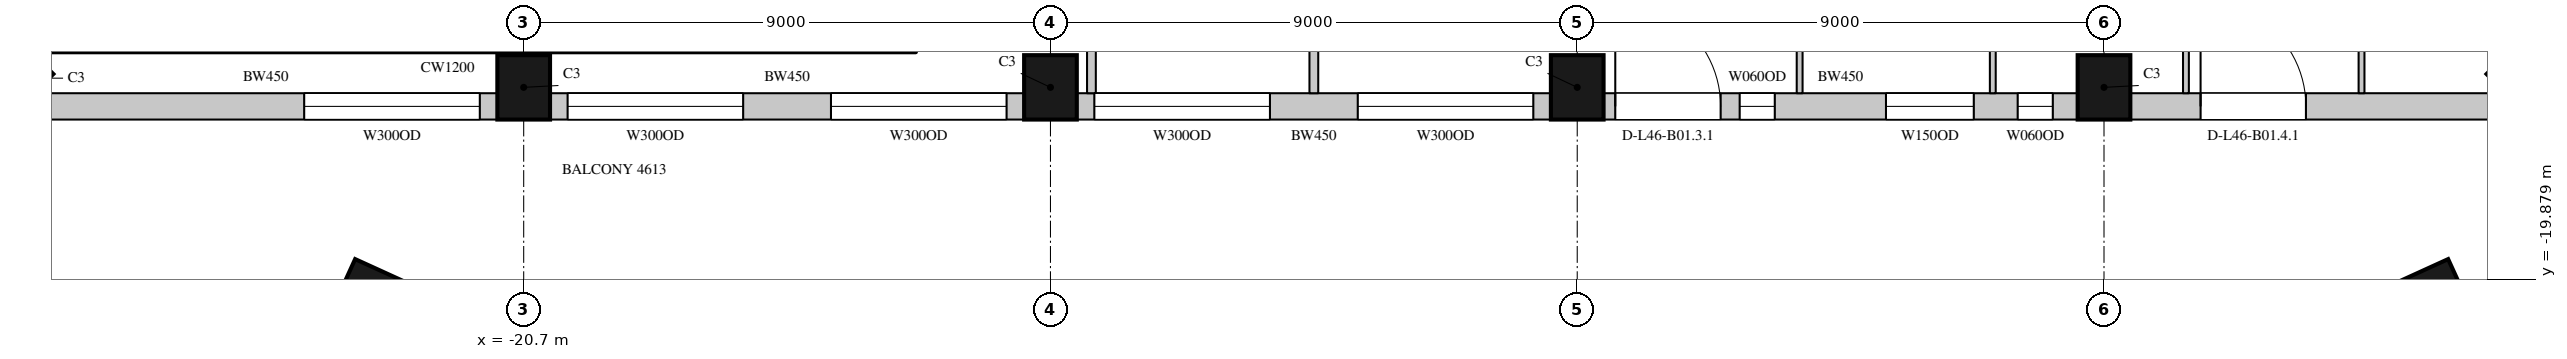
"""IFC4 building model, lengths in metres.
Left out: names, types, materials, properties, quantities, classifications, styles, units other than length and angle.
Written with IfcOpenShell. Run it as: python <this file> out.ifc"""

import sys

from ifc_helpers import new_model, si_unit, direction, frame, frame_2d, origin, origin_2d, place, context, subcontext, project, spatial, rectangle, extrude, element, fill, save


model = new_model("IFC4")
c1 = context("Model", 3, precision=1e-05, world=origin(), true_north=direction((0.0, 1.0)))
c2 = subcontext(c1, "Body", "Model", "MODEL_VIEW")
j1 = project(units=[si_unit("LENGTHUNIT", "METRE"), si_unit("PLANEANGLEUNIT", "RADIAN")], contexts=[c1])
p1 = place(None, origin())
s1 = spatial("IfcSite", under=j1, at=p1, CompositionType="ELEMENT")
p2 = place(p1, origin())
s2 = spatial("IfcBuilding", under=s1, at=p2, CompositionType="ELEMENT")
p3 = place(p2, frame((0.0, 0.0, 209.7)))
s3 = spatial("IfcBuildingStorey", under=s2, at=p3, CompositionType="ELEMENT", Elevation=209.7)
for number, where, z_axis, x_axis in (
    (1, (-29.443, -16.443, 0.0), (0.0, 0.0, 1.0), (0.707, -0.707, 0.0)),
    (2, (-20.7, -16.6, 0.0), (0.0, 0.0, 1.0), (1.0, 0.0, 0.0)),
    (3, (-11.7, -16.6, 0.0), (0.0, 0.0, 1.0), (1.0, 0.0, 0.0)),
    (4, (-2.7, -16.6, 0.0), (0.0, 0.0, 1.0), (1.0, 0.0, 0.0)),
    (5, (6.3, -16.6, 0.0), (0.0, 0.0, 1.0), (1.0, 0.0, 0.0)),
    (6, (13.543, -16.443, 0.0), (0.0, 0.0, 1.0), (0.707, 0.707, 0.0)),
    (7, (-23.398, -20.221, 0.0), (0.0, 0.0, 1.0), (0.91, -0.415, 0.0)),
    (8, (11.998, -20.221, 0.0), (0.0, 0.0, 1.0), (0.91, 0.415, 0.0)),
):
    element("IfcColumn", number, at=place(p3, frame(where, z_axis=z_axis, x_axis=x_axis)), inside=s3, PredefinedType="COLUMN", context=c2, shape_type="SweptSolid", body=[
        extrude(rectangle(XDim=0.9, YDim=1.1, at=origin_2d()), origin(), (0.0, 0.0, 1.0), 4.1),
    ])
p4 = place(p3, frame((-29.064, -16.925, 0.0), z_axis=(0.0, 0.0, 1.0), x_axis=(1.0, 0.0, 0.0)))
e9 = element("IfcWall", 9, at=p4, inside=s3, PredefinedType="SOLIDWALL", context=c2, shape_type="SweptSolid", body=[
    extrude(rectangle(XDim=7.914, YDim=0.45, at=frame_2d((3.957, 0.0))), origin(), (0.0, 0.0, 1.0), 3.8),
])
p5 = place(p4, frame((4.614, 0.0, 1.05)))
e10 = element("IfcOpeningElement", 10, at=p5, cuts=e9, PredefinedType="OPENING", context=c2, shape_type="SweptSolid", body=[
    extrude(rectangle(XDim=3.0, YDim=2.4, at=frame_2d((1.5, 1.2))), frame((0.0, 0.235, 0.0), z_axis=(0.0, -1.0, 0.0), x_axis=(1.0, 0.0, 0.0)), (0.0, 0.0, 1.0), 0.47),
])
p6 = place(p3, frame((-20.25, -16.925, 0.0), z_axis=(0.0, 0.0, 1.0), x_axis=(1.0, 0.0, 0.0)))
e11 = element("IfcWall", 11, at=p6, inside=s3, PredefinedType="SOLIDWALL", context=c2, shape_type="SweptSolid", body=[
    extrude(rectangle(XDim=8.1, YDim=0.45, at=frame_2d((4.05, 0.0))), origin(), (0.0, 0.0, 1.0), 3.8),
])
p7 = place(p6, frame((0.3, 0.0, 1.05)))
e12 = element("IfcOpeningElement", 12, at=p7, cuts=e11, PredefinedType="OPENING", context=c2, shape_type="SweptSolid", body=[
    extrude(rectangle(XDim=3.0, YDim=2.4, at=frame_2d((1.5, 1.2))), frame((0.0, 0.235, 0.0), z_axis=(0.0, -1.0, 0.0), x_axis=(1.0, 0.0, 0.0)), (0.0, 0.0, 1.0), 0.47),
])
p8 = place(p6, frame((4.8, 0.0, 1.05)))
e13 = element("IfcOpeningElement", 13, at=p8, cuts=e11, PredefinedType="OPENING", context=c2, shape_type="SweptSolid", body=[
    extrude(rectangle(XDim=3.0, YDim=2.4, at=frame_2d((1.5, 1.2))), frame((0.0, 0.235, 0.0), z_axis=(0.0, -1.0, 0.0), x_axis=(1.0, 0.0, 0.0)), (0.0, 0.0, 1.0), 0.47),
])
p9 = place(p3, frame((-11.25, -16.925, 0.0), z_axis=(0.0, 0.0, 1.0), x_axis=(1.0, 0.0, 0.0)))
e14 = element("IfcWall", 14, at=p9, inside=s3, PredefinedType="SOLIDWALL", context=c2, shape_type="SweptSolid", body=[
    extrude(rectangle(XDim=8.1, YDim=0.45, at=frame_2d((4.05, 0.0))), origin(), (0.0, 0.0, 1.0), 3.8),
])
p10 = place(p9, frame((0.3, 0.0, 1.05)))
e15 = element("IfcOpeningElement", 15, at=p10, cuts=e14, PredefinedType="OPENING", context=c2, shape_type="SweptSolid", body=[
    extrude(rectangle(XDim=3.0, YDim=2.4, at=frame_2d((1.5, 1.2))), frame((0.0, 0.235, 0.0), z_axis=(0.0, -1.0, 0.0), x_axis=(1.0, 0.0, 0.0)), (0.0, 0.0, 1.0), 0.47),
])
p11 = place(p9, frame((4.8, 0.0, 1.05)))
e16 = element("IfcOpeningElement", 16, at=p11, cuts=e14, PredefinedType="OPENING", context=c2, shape_type="SweptSolid", body=[
    extrude(rectangle(XDim=3.0, YDim=2.4, at=frame_2d((1.5, 1.2))), frame((0.0, 0.235, 0.0), z_axis=(0.0, -1.0, 0.0), x_axis=(1.0, 0.0, 0.0)), (0.0, 0.0, 1.0), 0.47),
])
p12 = place(p3, frame((-2.25, -16.925, 0.0), z_axis=(0.0, 0.0, 1.0), x_axis=(1.0, 0.0, 0.0)))
e17 = element("IfcWall", 17, at=p12, inside=s3, PredefinedType="SOLIDWALL", context=c2, shape_type="SweptSolid", body=[
    extrude(rectangle(XDim=8.1, YDim=0.45, at=frame_2d((4.05, 0.0))), origin(), (0.0, 0.0, 1.0), 3.8),
])
p13 = place(p12, frame((0.2, 0.0, 0.0)))
e18 = element("IfcOpeningElement", 18, at=p13, cuts=e17, PredefinedType="OPENING", context=c2, shape_type="SweptSolid", body=[
    extrude(rectangle(XDim=1.8, YDim=2.4, at=frame_2d((0.9, 1.2))), frame((0.0, 0.235, 0.0), z_axis=(0.0, -1.0, 0.0), x_axis=(1.0, 0.0, 0.0)), (0.0, 0.0, 1.0), 0.47),
])
p14 = place(p12, frame((2.325, 0.0, 1.05)))
e19 = element("IfcOpeningElement", 19, at=p14, cuts=e17, PredefinedType="OPENING", context=c2, shape_type="SweptSolid", body=[
    extrude(rectangle(XDim=0.6, YDim=2.4, at=frame_2d((0.3, 1.2))), frame((0.0, 0.235, 0.0), z_axis=(0.0, -1.0, 0.0), x_axis=(1.0, 0.0, 0.0)), (0.0, 0.0, 1.0), 0.47),
])
p15 = place(p12, frame((4.825, 0.0, 1.05)))
e20 = element("IfcOpeningElement", 20, at=p15, cuts=e17, PredefinedType="OPENING", context=c2, shape_type="SweptSolid", body=[
    extrude(rectangle(XDim=1.5, YDim=2.4, at=frame_2d((0.75, 1.2))), frame((0.0, 0.235, 0.0), z_axis=(0.0, -1.0, 0.0), x_axis=(1.0, 0.0, 0.0)), (0.0, 0.0, 1.0), 0.47),
])
p16 = place(p12, frame((7.075, 0.0, 1.05)))
e21 = element("IfcOpeningElement", 21, at=p16, cuts=e17, PredefinedType="OPENING", context=c2, shape_type="SweptSolid", body=[
    extrude(rectangle(XDim=0.6, YDim=2.4, at=frame_2d((0.3, 1.2))), frame((0.0, 0.235, 0.0), z_axis=(0.0, -1.0, 0.0), x_axis=(1.0, 0.0, 0.0)), (0.0, 0.0, 1.0), 0.47),
])
p17 = place(p3, frame((6.75, -16.925, 0.0), z_axis=(0.0, 0.0, 1.0), x_axis=(1.0, 0.0, 0.0)))
e22 = element("IfcWall", 22, at=p17, inside=s3, PredefinedType="SOLIDWALL", context=c2, shape_type="SweptSolid", body=[
    extrude(rectangle(XDim=6.414, YDim=0.45, at=frame_2d((3.207, 0.0))), origin(), (0.0, 0.0, 1.0), 3.8),
])
p18 = place(p17, frame((1.2, 0.0, 0.0)))
e23 = element("IfcOpeningElement", 23, at=p18, cuts=e22, PredefinedType="OPENING", context=c2, shape_type="SweptSolid", body=[
    extrude(rectangle(XDim=1.8, YDim=2.4, at=frame_2d((0.9, 1.2))), frame((0.0, 0.235, 0.0), z_axis=(0.0, -1.0, 0.0), x_axis=(1.0, 0.0, 0.0)), (0.0, 0.0, 1.0), 0.47),
])
p19 = place(p3, frame((-11.0, -16.7, 0.0), z_axis=(0.0, 0.0, 1.0), x_axis=(0.0, 1.0, 0.0)))
e24 = element("IfcWall", 24, at=p19, inside=s3, PredefinedType="PARTITIONING", context=c2, shape_type="SweptSolid", body=[
    extrude(rectangle(XDim=1.88, YDim=0.15, at=frame_2d((0.94, 0.0))), origin(), (0.0, 0.0, 1.0), 3.8),
])
p20 = place(p3, frame((-7.2, -16.7, 0.0), z_axis=(0.0, 0.0, 1.0), x_axis=(0.0, 1.0, 0.0)))
e25 = element("IfcWall", 25, at=p20, inside=s3, PredefinedType="PARTITIONING", context=c2, shape_type="SweptSolid", body=[
    extrude(rectangle(XDim=4.9, YDim=0.15, at=frame_2d((2.45, 0.0))), origin(), (0.0, 0.0, 1.0), 3.15),
])
for number, where, z_axis, x_axis in (
    (26, (1.1, -16.7, 0.0), (0.0, 0.0, 1.0), (0.0, 1.0, 0.0)),
    (27, (4.4, -16.7, 0.0), (0.0, 0.0, 1.0), (0.0, 1.0, 0.0)),
    (28, (7.7, -16.7, 0.0), (0.0, 0.0, 1.0), (0.0, 1.0, 0.0)),
):
    element("IfcWall", number, at=place(p3, frame(where, z_axis=z_axis, x_axis=x_axis)), inside=s3, PredefinedType="PARTITIONING", context=c2, shape_type="SweptSolid", body=[
        extrude(rectangle(XDim=4.9, YDim=0.1, at=frame_2d((2.45, 0.0))), origin(), (0.0, 0.0, 1.0), 3.8),
    ])
p21 = place(p3, frame((10.7, -16.7, 0.0), z_axis=(0.0, 0.0, 1.0), x_axis=(0.0, 1.0, 0.0)))
e29 = element("IfcWall", 29, at=p21, inside=s3, PredefinedType="PARTITIONING", context=c2, shape_type="SweptSolid", body=[
    extrude(rectangle(XDim=5.0, YDim=0.1, at=frame_2d((2.5, 0.0))), origin(), (0.0, 0.0, 1.0), 3.8),
])
p22 = place(p5, origin())
e30 = element("IfcWindow", 30, at=p22, inside=s3, PartitioningType="SINGLE_PANEL", PredefinedType="WINDOW", context=c2, shape_type="SweptSolid", body=[
    extrude(rectangle(XDim=3.0, YDim=2.4, at=frame_2d((1.5, 1.2))), frame((0.0, 0.135, 0.0), z_axis=(0.0, -1.0, 0.0), x_axis=(1.0, 0.0, 0.0)), (0.0, 0.0, 1.0), 0.06),
])
fill(e10, e30)
p23 = place(p7, origin())
e31 = element("IfcWindow", 31, at=p23, inside=s3, PartitioningType="SINGLE_PANEL", PredefinedType="WINDOW", context=c2, shape_type="SweptSolid", body=[
    extrude(rectangle(XDim=3.0, YDim=2.4, at=frame_2d((1.5, 1.2))), frame((0.0, 0.135, 0.0), z_axis=(0.0, -1.0, 0.0), x_axis=(1.0, 0.0, 0.0)), (0.0, 0.0, 1.0), 0.06),
])
fill(e12, e31)
p24 = place(p8, origin())
e32 = element("IfcWindow", 32, at=p24, inside=s3, PartitioningType="SINGLE_PANEL", PredefinedType="WINDOW", context=c2, shape_type="SweptSolid", body=[
    extrude(rectangle(XDim=3.0, YDim=2.4, at=frame_2d((1.5, 1.2))), frame((0.0, 0.135, 0.0), z_axis=(0.0, -1.0, 0.0), x_axis=(1.0, 0.0, 0.0)), (0.0, 0.0, 1.0), 0.06),
])
fill(e13, e32)
p25 = place(p10, origin())
e33 = element("IfcWindow", 33, at=p25, inside=s3, PartitioningType="SINGLE_PANEL", PredefinedType="WINDOW", context=c2, shape_type="SweptSolid", body=[
    extrude(rectangle(XDim=3.0, YDim=2.4, at=frame_2d((1.5, 1.2))), frame((0.0, 0.135, 0.0), z_axis=(0.0, -1.0, 0.0), x_axis=(1.0, 0.0, 0.0)), (0.0, 0.0, 1.0), 0.06),
])
fill(e15, e33)
p26 = place(p11, origin())
e34 = element("IfcWindow", 34, at=p26, inside=s3, PartitioningType="SINGLE_PANEL", PredefinedType="WINDOW", context=c2, shape_type="SweptSolid", body=[
    extrude(rectangle(XDim=3.0, YDim=2.4, at=frame_2d((1.5, 1.2))), frame((0.0, 0.135, 0.0), z_axis=(0.0, -1.0, 0.0), x_axis=(1.0, 0.0, 0.0)), (0.0, 0.0, 1.0), 0.06),
])
fill(e16, e34)
p27 = place(p13, origin())
e35 = element("IfcDoor", 35, at=p27, inside=s3, OperationType="SLIDING_TO_LEFT", PredefinedType="DOOR", context=c2, shape_type="SweptSolid", body=[
    extrude(rectangle(XDim=1.8, YDim=2.4, at=frame_2d((0.9, 1.2))), frame((0.0, 0.13, 0.0), z_axis=(0.0, -1.0, 0.0), x_axis=(1.0, 0.0, 0.0)), (0.0, 0.0, 1.0), 0.05),
])
fill(e18, e35)
p28 = place(p18, origin())
e36 = element("IfcDoor", 36, at=p28, inside=s3, OperationType="SLIDING_TO_LEFT", PredefinedType="DOOR", context=c2, shape_type="SweptSolid", body=[
    extrude(rectangle(XDim=1.8, YDim=2.4, at=frame_2d((0.9, 1.2))), frame((0.0, 0.13, 0.0), z_axis=(0.0, -1.0, 0.0), x_axis=(1.0, 0.0, 0.0)), (0.0, 0.0, 1.0), 0.05),
])
fill(e23, e36)
p29 = place(p14, origin())
e37 = element("IfcWindow", 37, at=p29, inside=s3, PartitioningType="SINGLE_PANEL", PredefinedType="WINDOW", context=c2, shape_type="SweptSolid", body=[
    extrude(rectangle(XDim=0.6, YDim=2.4, at=frame_2d((0.3, 1.2))), frame((0.0, 0.135, 0.0), z_axis=(0.0, -1.0, 0.0), x_axis=(1.0, 0.0, 0.0)), (0.0, 0.0, 1.0), 0.06),
])
fill(e19, e37)
p30 = place(p15, origin())
e38 = element("IfcWindow", 38, at=p30, inside=s3, PartitioningType="SINGLE_PANEL", PredefinedType="WINDOW", context=c2, shape_type="SweptSolid", body=[
    extrude(rectangle(XDim=1.5, YDim=2.4, at=frame_2d((0.75, 1.2))), frame((0.0, 0.135, 0.0), z_axis=(0.0, -1.0, 0.0), x_axis=(1.0, 0.0, 0.0)), (0.0, 0.0, 1.0), 0.06),
])
fill(e20, e38)
p31 = place(p16, origin())
e39 = element("IfcWindow", 39, at=p31, inside=s3, PartitioningType="SINGLE_PANEL", PredefinedType="WINDOW", context=c2, shape_type="SweptSolid", body=[
    extrude(rectangle(XDim=0.6, YDim=2.4, at=frame_2d((0.3, 1.2))), frame((0.0, 0.135, 0.0), z_axis=(0.0, -1.0, 0.0), x_axis=(1.0, 0.0, 0.0)), (0.0, 0.0, 1.0), 0.06),
])
fill(e21, e39)
save(model, sys.argv[1])
